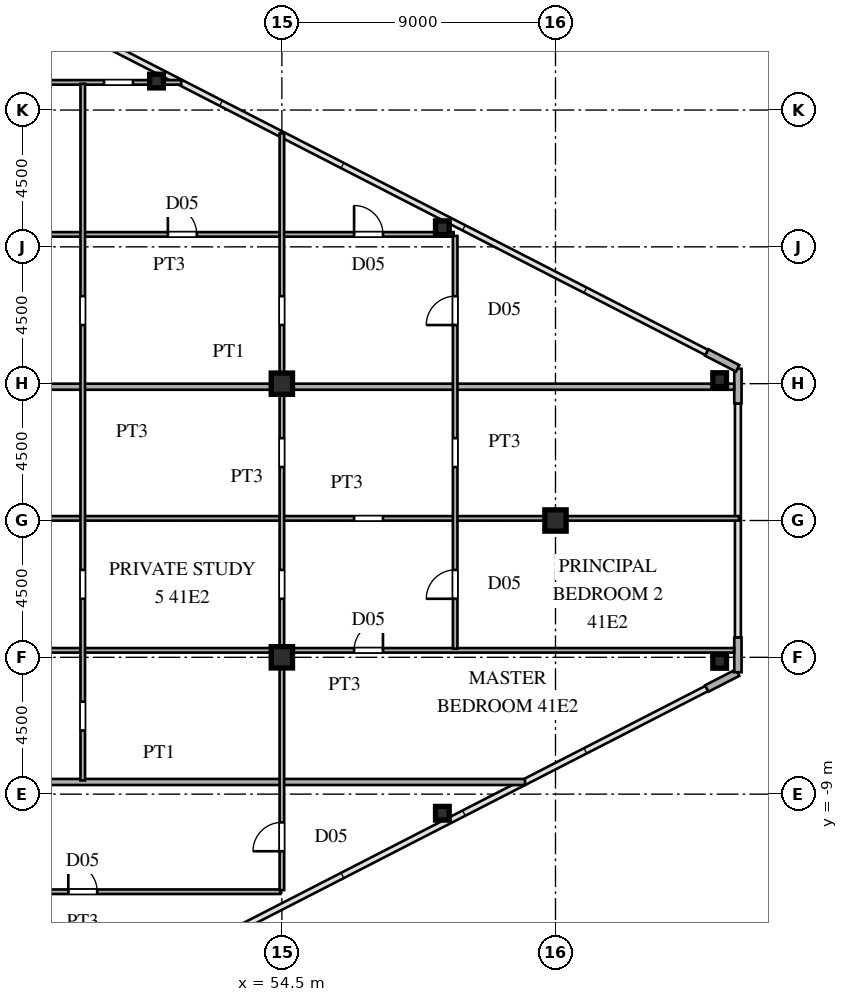
"""IFC4 building model, lengths in metres.
Left out: names, types, materials, properties, quantities, classifications, styles, units other than length and angle.
Written with IfcOpenShell. Run it as: python <this file> out.ifc"""

import sys

from ifc_helpers import new_model, si_unit, direction, frame, frame_2d, origin, origin_2d, place, context, subcontext, project, spatial, rectangle, hollow_rectangle, i_section, extrude, source, transform, mapped, element, fill, save


model = new_model("IFC4")
c1 = context("Model", 3, precision=1e-05, world=origin(), true_north=direction((0.0, 1.0)))
c2 = subcontext(c1, "Body", "Model", "MODEL_VIEW")
j1 = project(units=[si_unit("LENGTHUNIT", "METRE"), si_unit("PLANEANGLEUNIT", "RADIAN")], contexts=[c1])
p1 = place(None, origin())
s1 = spatial("IfcSite", under=j1, at=p1, CompositionType="ELEMENT")
p2 = place(p1, origin())
s2 = spatial("IfcBuilding", under=s1, at=p2, CompositionType="ELEMENT")
p3 = place(p2, frame((0.0, 0.0, 154.8)))
s3 = spatial("IfcBuildingStorey", under=s2, at=p3, CompositionType="ELEMENT", Elevation=154.8)
m1 = source(origin(), c2, "Body", "SweptSolid", [
    extrude(i_section(OverallWidth=0.7, OverallDepth=0.7, WebThickness=0.028, FlangeThickness=0.045, at=origin_2d()), origin(), (0.0, 0.0, 1.0), 3.6),
])
for number, where, z_axis, x_axis in (
    (1, (54.5, -4.5, 0.0), (0.0, 0.0, 1.0), (1.0, 0.0, 0.0)),
    (2, (54.5, 4.5, 0.0), (0.0, 0.0, 1.0), (1.0, 0.0, 0.0)),
    (3, (63.5, 0.0, 0.0), (0.0, 0.0, 1.0), (1.0, 0.0, 0.0)),
):
    element("IfcColumn", number, at=place(p3, frame(where, z_axis=z_axis, x_axis=x_axis)), inside=s3, PredefinedType="COLUMN", context=c2, shape_type="MappedRepresentation", body=[
        mapped(m1, transform((0.0, 0.0, 0.0), scale=1.0)),
    ])
m2 = source(origin(), c2, "Body", "SweptSolid", [
    extrude(hollow_rectangle(XDim=0.45, YDim=0.45, WallThickness=0.018, at=origin_2d()), origin(), (0.0, 0.0, 1.0), 3.6),
])
for number, where, z_axis, x_axis in (
    (4, (68.9, -4.634, 0.0), (0.0, 0.0, 1.0), (1.0, 0.0, 0.0)),
    (5, (68.9, 4.634, 0.0), (0.0, 0.0, 1.0), (1.0, 0.0, 0.0)),
    (6, (59.779, -9.629, 0.0), (0.0, 0.0, 1.0), (1.0, 0.0, 0.0)),
    (7, (50.377, 14.453, 0.0), (0.0, 0.0, 1.0), (1.0, 0.0, 0.0)),
    (8, (59.779, 9.629, 0.0), (0.0, 0.0, 1.0), (1.0, 0.0, 0.0)),
):
    element("IfcColumn", number, at=place(p3, frame(where, z_axis=z_axis, x_axis=x_axis)), inside=s3, PredefinedType="COLUMN", context=c2, shape_type="MappedRepresentation", body=[
        mapped(m2, transform((0.0, 0.0, 0.0), scale=1.0)),
    ])
p4 = place(p3, frame((68.477, -5.525, 0.0), z_axis=(0.0, 0.0, 1.0), x_axis=(0.889797395748, 0.456355776255, 0.0)))
e9 = element("IfcWall", 9, at=p4, inside=s3, PredefinedType="SOLIDWALL", context=c2, shape_type="SweptSolid", body=[
    extrude(rectangle(XDim=1.14, YDim=0.24, at=frame_2d((0.57, 0.0))), origin(), (0.0, 0.0, 1.0), 3.38),
])
for number, where, z_axis, x_axis in (
    (10, (69.5, -4.99, 0.0), (0.0, 0.0, 1.0), (0.0, 1.0, 0.0)),
    (11, (69.5, 3.85, 0.0), (0.0, 0.0, 1.0), (0.0, 1.0, 0.0)),
):
    element("IfcWall", number, at=place(p3, frame(where, z_axis=z_axis, x_axis=x_axis)), inside=s3, PredefinedType="SOLIDWALL", context=c2, shape_type="SweptSolid", body=[
        extrude(rectangle(XDim=1.14, YDim=0.24, at=frame_2d((0.57, 0.0))), origin(), (0.0, 0.0, 1.0), 3.38),
    ])
p5 = place(p3, frame((69.491, 5.005, 0.0), z_axis=(0.0, 0.0, 1.0), x_axis=(-0.889797395748, 0.456355776255, 0.0)))
e12 = element("IfcWall", 12, at=p5, inside=s3, PredefinedType="SOLIDWALL", context=c2, shape_type="SweptSolid", body=[
    extrude(rectangle(XDim=1.14, YDim=0.24, at=frame_2d((0.57, 0.0))), origin(), (0.0, 0.0, 1.0), 3.38),
])
p6 = place(p3, frame((41.45, -12.21, 0.0), z_axis=(0.0, 0.0, 1.0), x_axis=(1.0, 0.0, 0.0)))
e13 = element("IfcWall", 13, at=p6, inside=s3, PredefinedType="PARTITIONING", context=c2, shape_type="SweptSolid", body=[
    extrude(rectangle(XDim=13.0, YDim=0.15, at=frame_2d((6.5, 0.0))), origin(), (0.0, 0.0, 1.0), 3.38),
])
p7 = place(p6, frame((6.025, 0.0, 0.0)))
e14 = element("IfcOpeningElement", 14, at=p7, cuts=e13, PredefinedType="OPENING", context=c2, shape_type="SweptSolid", body=[
    extrude(rectangle(XDim=0.95, YDim=2.15, at=frame_2d((0.475, 1.075))), frame((0.0, 0.085, 0.0), z_axis=(0.0, -1.0, 0.0), x_axis=(1.0, 0.0, 0.0)), (0.0, 0.0, 1.0), 0.17),
])
p8 = place(p3, frame((38.43, -8.6, 0.0), z_axis=(0.0, 0.0, 1.0), x_axis=(1.0, 0.0, 0.0)))
e15 = element("IfcWall", 15, at=p8, inside=s3, PredefinedType="PARTITIONING", context=c2, shape_type="SweptSolid", body=[
    extrude(rectangle(XDim=24.066, YDim=0.2, at=frame_2d((12.033, 0.0))), origin(), (0.0, 0.0, 1.0), 3.38),
])
p9 = place(p3, frame((41.45, -4.27, 0.0), z_axis=(0.0, 0.0, 1.0), x_axis=(1.0, 0.0, 0.0)))
e16 = element("IfcWall", 16, at=p9, inside=s3, PredefinedType="PARTITIONING", context=c2, shape_type="SweptSolid", body=[
    extrude(rectangle(XDim=27.925, YDim=0.15, at=frame_2d((13.962, 0.0))), origin(), (0.0, 0.0, 1.0), 3.38),
])
p10 = place(p9, frame((2.676, 0.0, 0.0)))
e17 = element("IfcOpeningElement", 17, at=p10, cuts=e16, PredefinedType="OPENING", context=c2, shape_type="SweptSolid", body=[
    extrude(rectangle(XDim=0.95, YDim=2.15, at=frame_2d((0.475, 1.075))), frame((0.0, 0.085, 0.0), z_axis=(0.0, -1.0, 0.0), x_axis=(1.0, 0.0, 0.0)), (0.0, 0.0, 1.0), 0.17),
])
p11 = place(p9, frame((15.425, 0.0, 0.0)))
e18 = element("IfcOpeningElement", 18, at=p11, cuts=e16, PredefinedType="OPENING", context=c2, shape_type="SweptSolid", body=[
    extrude(rectangle(XDim=0.95, YDim=2.15, at=frame_2d((0.475, 1.075))), frame((0.0, 0.085, 0.0), z_axis=(0.0, -1.0, 0.0), x_axis=(1.0, 0.0, 0.0)), (0.0, 0.0, 1.0), 0.17),
])
p12 = place(p3, frame((41.45, 0.07, 0.0), z_axis=(0.0, 0.0, 1.0), x_axis=(1.0, 0.0, 0.0)))
e19 = element("IfcWall", 19, at=p12, inside=s3, PredefinedType="PARTITIONING", context=c2, shape_type="SweptSolid", body=[
    extrude(rectangle(XDim=28.085, YDim=0.15, at=frame_2d((14.042, 0.0))), origin(), (0.0, 0.0, 1.0), 3.38),
])
p13 = place(p12, frame((2.75, 0.0, 0.0)))
e20 = element("IfcOpeningElement", 20, at=p13, cuts=e19, PredefinedType="OPENING", context=c2, shape_type="SweptSolid", body=[
    extrude(rectangle(XDim=0.95, YDim=2.15, at=frame_2d((0.475, 1.075))), frame((0.0, 0.085, 0.0), z_axis=(0.0, -1.0, 0.0), x_axis=(1.0, 0.0, 0.0)), (0.0, 0.0, 1.0), 0.17),
])
p14 = place(p12, frame((15.425, 0.0, 0.0)))
e21 = element("IfcOpeningElement", 21, at=p14, cuts=e19, PredefinedType="OPENING", context=c2, shape_type="SweptSolid", body=[
    extrude(rectangle(XDim=0.95, YDim=2.15, at=frame_2d((0.475, 1.075))), frame((0.0, 0.085, 0.0), z_axis=(0.0, -1.0, 0.0), x_axis=(1.0, 0.0, 0.0)), (0.0, 0.0, 1.0), 0.17),
])
p15 = place(p3, frame((38.43, 4.4, 0.0), z_axis=(0.0, 0.0, 1.0), x_axis=(1.0, 0.0, 0.0)))
e22 = element("IfcWall", 22, at=p15, inside=s3, PredefinedType="PARTITIONING", context=c2, shape_type="SweptSolid", body=[
    extrude(rectangle(XDim=16.09, YDim=0.2, at=frame_2d((8.045, 0.0))), origin(), (0.0, 0.0, 1.0), 2.78),
])
p16 = place(p3, frame((54.52, 4.4, 0.0), z_axis=(0.0, 0.0, 1.0), x_axis=(1.0, 0.0, 0.0)))
e23 = element("IfcWall", 23, at=p16, inside=s3, PredefinedType="PARTITIONING", context=c2, shape_type="SweptSolid", body=[
    extrude(rectangle(XDim=14.855, YDim=0.2, at=frame_2d((7.427, 0.0))), origin(), (0.0, 0.0, 1.0), 3.38),
])
p17 = place(p3, frame((41.45, 9.41, 0.0), z_axis=(0.0, 0.0, 1.0), x_axis=(1.0, 0.0, 0.0)))
e24 = element("IfcWall", 24, at=p17, inside=s3, PredefinedType="PARTITIONING", context=c2, shape_type="SweptSolid", body=[
    extrude(rectangle(XDim=18.7, YDim=0.15, at=frame_2d((9.35, 0.0))), origin(), (0.0, 0.0, 1.0), 3.38),
])
p18 = place(p17, frame((2.75, 0.0, 0.0)))
e25 = element("IfcOpeningElement", 25, at=p18, cuts=e24, PredefinedType="OPENING", context=c2, shape_type="SweptSolid", body=[
    extrude(rectangle(XDim=0.95, YDim=2.15, at=frame_2d((0.475, 1.075))), frame((0.0, 0.085, 0.0), z_axis=(0.0, -1.0, 0.0), x_axis=(1.0, 0.0, 0.0)), (0.0, 0.0, 1.0), 0.17),
])
p19 = place(p17, frame((15.425, 0.0, 0.0)))
e26 = element("IfcOpeningElement", 26, at=p19, cuts=e24, PredefinedType="OPENING", context=c2, shape_type="SweptSolid", body=[
    extrude(rectangle(XDim=0.95, YDim=2.15, at=frame_2d((0.475, 1.075))), frame((0.0, 0.085, 0.0), z_axis=(0.0, -1.0, 0.0), x_axis=(1.0, 0.0, 0.0)), (0.0, 0.0, 1.0), 0.17),
])
p20 = place(p17, frame((9.3, 0.0, 0.0)))
e27 = element("IfcOpeningElement", 27, at=p20, cuts=e24, PredefinedType="OPENING", context=c2, shape_type="SweptSolid", body=[
    extrude(rectangle(XDim=0.95, YDim=2.15, at=frame_2d((0.475, 1.075))), frame((0.0, 0.085, 0.0), z_axis=(0.0, -1.0, 0.0), x_axis=(1.0, 0.0, 0.0)), (0.0, 0.0, 1.0), 0.17),
])
p21 = place(p3, frame((41.45, 14.41, 0.0), z_axis=(0.0, 0.0, 1.0), x_axis=(1.0, 0.0, 0.0)))
e28 = element("IfcWall", 28, at=p21, inside=s3, PredefinedType="PARTITIONING", context=c2, shape_type="SweptSolid", body=[
    extrude(rectangle(XDim=9.741, YDim=0.15, at=frame_2d((4.871, 0.0))), origin(), (0.0, 0.0, 1.0), 3.38),
])
p22 = place(p21, frame((7.201, 0.0, 0.0)))
e29 = element("IfcOpeningElement", 29, at=p22, cuts=e28, PredefinedType="OPENING", context=c2, shape_type="SweptSolid", body=[
    extrude(rectangle(XDim=0.95, YDim=2.15, at=frame_2d((0.475, 1.075))), frame((0.0, 0.085, 0.0), z_axis=(0.0, -1.0, 0.0), x_axis=(1.0, 0.0, 0.0)), (0.0, 0.0, 1.0), 0.17),
])
p23 = place(p3, frame((47.95, -8.55, 0.0), z_axis=(0.0, 0.0, 1.0), x_axis=(0.0, 1.0, 0.0)))
e30 = element("IfcWall", 30, at=p23, inside=s3, PredefinedType="PARTITIONING", context=c2, shape_type="SweptSolid", body=[
    extrude(rectangle(XDim=22.913, YDim=0.15, at=frame_2d((11.457, 0.0))), origin(), (0.0, 0.0, 1.0), 3.38),
])
p24 = place(p23, frame((5.975, 0.0, 0.0)))
e31 = element("IfcOpeningElement", 31, at=p24, cuts=e30, PredefinedType="OPENING", context=c2, shape_type="SweptSolid", body=[
    extrude(rectangle(XDim=0.95, YDim=2.15, at=frame_2d((0.475, 1.075))), frame((0.0, 0.085, 0.0), z_axis=(0.0, -1.0, 0.0), x_axis=(1.0, 0.0, 0.0)), (0.0, 0.0, 1.0), 0.17),
])
p25 = place(p23, frame((1.642, 0.0, 0.0)))
e32 = element("IfcOpeningElement", 32, at=p25, cuts=e30, PredefinedType="OPENING", context=c2, shape_type="SweptSolid", body=[
    extrude(rectangle(XDim=0.95, YDim=2.15, at=frame_2d((0.475, 1.075))), frame((0.0, 0.085, 0.0), z_axis=(0.0, -1.0, 0.0), x_axis=(1.0, 0.0, 0.0)), (0.0, 0.0, 1.0), 0.17),
])
p26 = place(p23, frame((14.978, 0.0, 0.0)))
e33 = element("IfcOpeningElement", 33, at=p26, cuts=e30, PredefinedType="OPENING", context=c2, shape_type="SweptSolid", body=[
    extrude(rectangle(XDim=0.95, YDim=2.15, at=frame_2d((0.475, 1.075))), frame((0.0, 0.085, 0.0), z_axis=(0.0, -1.0, 0.0), x_axis=(1.0, 0.0, 0.0)), (0.0, 0.0, 1.0), 0.17),
])
p27 = place(p3, frame((54.5, -12.157, 0.0), z_axis=(0.0, 0.0, 1.0), x_axis=(0.0, 1.0, 0.0)))
e34 = element("IfcWall", 34, at=p27, inside=s3, PredefinedType="PARTITIONING", context=c2, shape_type="SweptSolid", body=[
    extrude(rectangle(XDim=24.889, YDim=0.15, at=frame_2d((12.444, 0.0))), origin(), (0.0, 0.0, 1.0), 2.78),
])
p28 = place(p27, frame((1.279, 0.0, 0.0)))
e35 = element("IfcOpeningElement", 35, at=p28, cuts=e34, PredefinedType="OPENING", context=c2, shape_type="SweptSolid", body=[
    extrude(rectangle(XDim=0.95, YDim=2.15, at=frame_2d((0.475, 1.075))), frame((0.0, 0.085, 0.0), z_axis=(0.0, -1.0, 0.0), x_axis=(1.0, 0.0, 0.0)), (0.0, 0.0, 1.0), 0.17),
])
p29 = place(p27, frame((9.582, 0.0, 0.0)))
e36 = element("IfcOpeningElement", 36, at=p29, cuts=e34, PredefinedType="OPENING", context=c2, shape_type="SweptSolid", body=[
    extrude(rectangle(XDim=0.95, YDim=2.15, at=frame_2d((0.475, 1.075))), frame((0.0, 0.085, 0.0), z_axis=(0.0, -1.0, 0.0), x_axis=(1.0, 0.0, 0.0)), (0.0, 0.0, 1.0), 0.17),
])
p30 = place(p27, frame((13.915, 0.0, 0.0)))
e37 = element("IfcOpeningElement", 37, at=p30, cuts=e34, PredefinedType="OPENING", context=c2, shape_type="SweptSolid", body=[
    extrude(rectangle(XDim=0.95, YDim=2.15, at=frame_2d((0.475, 1.075))), frame((0.0, 0.085, 0.0), z_axis=(0.0, -1.0, 0.0), x_axis=(1.0, 0.0, 0.0)), (0.0, 0.0, 1.0), 0.17),
])
p31 = place(p27, frame((18.585, 0.0, 0.0)))
e38 = element("IfcOpeningElement", 38, at=p31, cuts=e34, PredefinedType="OPENING", context=c2, shape_type="SweptSolid", body=[
    extrude(rectangle(XDim=0.95, YDim=2.15, at=frame_2d((0.475, 1.075))), frame((0.0, 0.085, 0.0), z_axis=(0.0, -1.0, 0.0), x_axis=(1.0, 0.0, 0.0)), (0.0, 0.0, 1.0), 0.17),
])
p32 = place(p3, frame((60.2, -4.217, 0.0), z_axis=(0.0, 0.0, 1.0), x_axis=(0.0, 1.0, 0.0)))
e39 = element("IfcWall", 39, at=p32, inside=s3, PredefinedType="PARTITIONING", context=c2, shape_type="SweptSolid", body=[
    extrude(rectangle(XDim=13.574, YDim=0.15, at=frame_2d((6.787, 0.0))), origin(), (0.0, 0.0, 1.0), 3.38),
])
p33 = place(p32, frame((1.642, 0.0, 0.0)))
e40 = element("IfcOpeningElement", 40, at=p33, cuts=e39, PredefinedType="OPENING", context=c2, shape_type="SweptSolid", body=[
    extrude(rectangle(XDim=0.95, YDim=2.15, at=frame_2d((0.475, 1.075))), frame((0.0, 0.085, 0.0), z_axis=(0.0, -1.0, 0.0), x_axis=(1.0, 0.0, 0.0)), (0.0, 0.0, 1.0), 0.17),
])
p34 = place(p32, frame((5.975, 0.0, 0.0)))
e41 = element("IfcOpeningElement", 41, at=p34, cuts=e39, PredefinedType="OPENING", context=c2, shape_type="SweptSolid", body=[
    extrude(rectangle(XDim=0.95, YDim=2.15, at=frame_2d((0.475, 1.075))), frame((0.0, 0.085, 0.0), z_axis=(0.0, -1.0, 0.0), x_axis=(1.0, 0.0, 0.0)), (0.0, 0.0, 1.0), 0.17),
])
p35 = place(p32, frame((10.645, 0.0, 0.0)))
e42 = element("IfcOpeningElement", 42, at=p35, cuts=e39, PredefinedType="OPENING", context=c2, shape_type="SweptSolid", body=[
    extrude(rectangle(XDim=0.95, YDim=2.15, at=frame_2d((0.475, 1.075))), frame((0.0, 0.085, 0.0), z_axis=(0.0, -1.0, 0.0), x_axis=(1.0, 0.0, 0.0)), (0.0, 0.0, 1.0), 0.17),
])
m3 = source(origin(), c2, "Body", "SweptSolid", [
    extrude(rectangle(XDim=0.95, YDim=2.15, at=frame_2d((0.475, 1.075))), frame((0.0, 0.025, 0.0), z_axis=(0.0, -1.0, 0.0), x_axis=(1.0, 0.0, 0.0)), (0.0, 0.0, 1.0), 0.05),
])
p36 = place(p7, origin())
e43 = element("IfcDoor", 43, at=p36, inside=s3, OperationType="SINGLE_SWING_LEFT", PredefinedType="DOOR", context=c2, shape_type="MappedRepresentation", body=[
    mapped(m3, transform((0.0, 0.0, 0.0), scale=1.0)),
])
fill(e14, e43)
p37 = place(p11, origin())
e44 = element("IfcDoor", 44, at=p37, inside=s3, OperationType="SINGLE_SWING_RIGHT", PredefinedType="DOOR", context=c2, shape_type="MappedRepresentation", body=[
    mapped(m3, transform((0.0, 0.0, 0.0), scale=1.0)),
])
fill(e18, e44)
p38 = place(p19, origin())
e45 = element("IfcDoor", 45, at=p38, inside=s3, OperationType="SINGLE_SWING_LEFT", PredefinedType="DOOR", context=c2, shape_type="MappedRepresentation", body=[
    mapped(m3, transform((0.0, 0.0, 0.0), scale=1.0)),
])
fill(e26, e45)
p39 = place(p20, origin())
e46 = element("IfcDoor", 46, at=p39, inside=s3, OperationType="SINGLE_SWING_LEFT", PredefinedType="DOOR", context=c2, shape_type="MappedRepresentation", body=[
    mapped(m3, transform((0.0, 0.0, 0.0), scale=1.0)),
])
fill(e27, e46)
p40 = place(p28, origin())
e47 = element("IfcDoor", 47, at=p40, inside=s3, OperationType="SINGLE_SWING_LEFT", PredefinedType="DOOR", context=c2, shape_type="MappedRepresentation", body=[
    mapped(m3, transform((0.0, 0.0, 0.0), scale=1.0)),
])
fill(e35, e47)
p41 = place(p33, origin())
e48 = element("IfcDoor", 48, at=p41, inside=s3, OperationType="SINGLE_SWING_LEFT", PredefinedType="DOOR", context=c2, shape_type="MappedRepresentation", body=[
    mapped(m3, transform((0.0, 0.0, 0.0), scale=1.0)),
])
fill(e40, e48)
p42 = place(p35, origin())
e49 = element("IfcDoor", 49, at=p42, inside=s3, OperationType="SINGLE_SWING_LEFT", PredefinedType="DOOR", context=c2, shape_type="MappedRepresentation", body=[
    mapped(m3, transform((0.0, 0.0, 0.0), scale=1.0)),
])
fill(e42, e49)
save(model, sys.argv[1])
